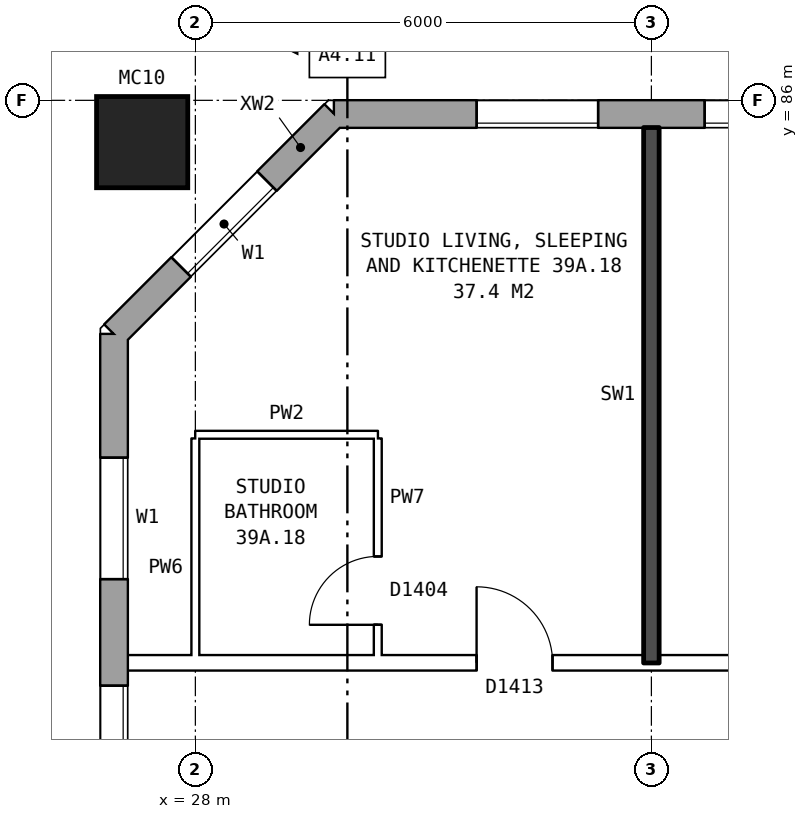
"""IFC4 building model, lengths in metres.
Left out: names, types, materials, properties, quantities, classifications, styles, units other than length and angle.
Written with IfcOpenShell. Run it as: python <this file> out.ifc"""

import sys

from ifc_helpers import new_model, si_unit, direction, frame, frame_2d, origin, origin_2d, place, context, subcontext, project, spatial, rectangle, hollow_rectangle, extrude, element, fill, save


model = new_model("IFC4")
c1 = context("Model", 3, precision=1e-05, world=origin(), true_north=direction((0.0, 1.0)))
c2 = subcontext(c1, "Body", "Model", "MODEL_VIEW")
j1 = project(units=[si_unit("LENGTHUNIT", "METRE"), si_unit("PLANEANGLEUNIT", "RADIAN")], contexts=[c1])
p1 = place(None, origin())
s1 = spatial("IfcSite", under=j1, at=p1, CompositionType="ELEMENT")
p2 = place(p1, origin())
s2 = spatial("IfcBuilding", under=s1, at=p2, CompositionType="ELEMENT")
p3 = place(p2, frame((0.0, 0.0, 139.2)))
s3 = spatial("IfcBuildingStorey", under=s2, at=p3, CompositionType="ELEMENT", Elevation=139.2)
p4 = place(p3, frame((27.3, 85.45, 0.0), z_axis=(0.0, 0.0, 1.0), x_axis=(1.0, 0.0, 0.0)))
e1 = element("IfcColumn", 1, at=p4, inside=s3, PredefinedType="COLUMN", context=c2, shape_type="SweptSolid", body=[
    extrude(hollow_rectangle(XDim=1.2, YDim=1.2, WallThickness=0.065, at=origin_2d()), origin(), (0.0, 0.0, 1.0), 3.1),
])
p5 = place(p3, frame((72.925, 85.82, 0.0), z_axis=(0.0, 0.0, 1.0), x_axis=(-1.0, 0.0, 0.0)))
e2 = element("IfcWall", 2, at=p5, inside=s3, PredefinedType="STANDARD", context=c2, shape_type="SweptSolid", body=[
    extrude(rectangle(XDim=43.101, YDim=0.36, at=frame_2d((21.55, 0.0))), origin(), (0.0, 0.0, 1.0), 2.85),
])
p6 = place(p5, frame((0.625, 0.0, 0.8)))
e3 = element("IfcOpeningElement", 3, at=p6, cuts=e2, PredefinedType="OPENING", context=c2, shape_type="SweptSolid", body=[
    extrude(rectangle(XDim=1.6, YDim=1.8, at=frame_2d((0.8, 0.9))), frame((0.0, 0.19, 0.0), z_axis=(0.0, -1.0, 0.0), x_axis=(1.0, 0.0, 0.0)), (0.0, 0.0, 1.0), 0.38),
])
p7 = place(p5, frame((3.625, 0.0, 0.8)))
e4 = element("IfcOpeningElement", 4, at=p7, cuts=e2, PredefinedType="OPENING", context=c2, shape_type="SweptSolid", body=[
    extrude(rectangle(XDim=1.6, YDim=1.8, at=frame_2d((0.8, 0.9))), frame((0.0, 0.19, 0.0), z_axis=(0.0, -1.0, 0.0), x_axis=(1.0, 0.0, 0.0)), (0.0, 0.0, 1.0), 0.38),
])
p8 = place(p5, frame((6.625, 0.0, 0.8)))
e5 = element("IfcOpeningElement", 5, at=p8, cuts=e2, PredefinedType="OPENING", context=c2, shape_type="SweptSolid", body=[
    extrude(rectangle(XDim=1.6, YDim=1.8, at=frame_2d((0.8, 0.9))), frame((0.0, 0.19, 0.0), z_axis=(0.0, -1.0, 0.0), x_axis=(1.0, 0.0, 0.0)), (0.0, 0.0, 1.0), 0.38),
])
p9 = place(p5, frame((9.625, 0.0, 0.8)))
e6 = element("IfcOpeningElement", 6, at=p9, cuts=e2, PredefinedType="OPENING", context=c2, shape_type="SweptSolid", body=[
    extrude(rectangle(XDim=1.6, YDim=1.8, at=frame_2d((0.8, 0.9))), frame((0.0, 0.19, 0.0), z_axis=(0.0, -1.0, 0.0), x_axis=(1.0, 0.0, 0.0)), (0.0, 0.0, 1.0), 0.38),
])
p10 = place(p5, frame((12.625, 0.0, 0.8)))
e7 = element("IfcOpeningElement", 7, at=p10, cuts=e2, PredefinedType="OPENING", context=c2, shape_type="SweptSolid", body=[
    extrude(rectangle(XDim=1.6, YDim=1.8, at=frame_2d((0.8, 0.9))), frame((0.0, 0.19, 0.0), z_axis=(0.0, -1.0, 0.0), x_axis=(1.0, 0.0, 0.0)), (0.0, 0.0, 1.0), 0.38),
])
p11 = place(p5, frame((15.625, 0.0, 0.8)))
e8 = element("IfcOpeningElement", 8, at=p11, cuts=e2, PredefinedType="OPENING", context=c2, shape_type="SweptSolid", body=[
    extrude(rectangle(XDim=1.6, YDim=1.8, at=frame_2d((0.8, 0.9))), frame((0.0, 0.19, 0.0), z_axis=(0.0, -1.0, 0.0), x_axis=(1.0, 0.0, 0.0)), (0.0, 0.0, 1.0), 0.38),
])
p12 = place(p5, frame((18.075, 0.0, 0.8)))
e9 = element("IfcOpeningElement", 9, at=p12, cuts=e2, PredefinedType="OPENING", context=c2, shape_type="SweptSolid", body=[
    extrude(rectangle(XDim=0.8, YDim=1.8, at=frame_2d((0.4, 0.9))), frame((0.0, 0.19, 0.0), z_axis=(0.0, -1.0, 0.0), x_axis=(1.0, 0.0, 0.0)), (0.0, 0.0, 1.0), 0.38),
])
p13 = place(p5, frame((21.125, 0.0, 0.15)))
e10 = element("IfcOpeningElement", 10, at=p13, cuts=e2, PredefinedType="OPENING", context=c2, shape_type="SweptSolid", body=[
    extrude(rectangle(XDim=1.0, YDim=1.5, at=frame_2d((0.5, 0.75))), frame((0.0, 0.19, 0.0), z_axis=(0.0, -1.0, 0.0), x_axis=(1.0, 0.0, 0.0)), (0.0, 0.0, 1.0), 0.38),
])
p14 = place(p5, frame((24.625, 0.0, 0.8)))
e11 = element("IfcOpeningElement", 11, at=p14, cuts=e2, PredefinedType="OPENING", context=c2, shape_type="SweptSolid", body=[
    extrude(rectangle(XDim=1.6, YDim=1.8, at=frame_2d((0.8, 0.9))), frame((0.0, 0.19, 0.0), z_axis=(0.0, -1.0, 0.0), x_axis=(1.0, 0.0, 0.0)), (0.0, 0.0, 1.0), 0.38),
])
p15 = place(p5, frame((27.625, 0.0, 0.8)))
e12 = element("IfcOpeningElement", 12, at=p15, cuts=e2, PredefinedType="OPENING", context=c2, shape_type="SweptSolid", body=[
    extrude(rectangle(XDim=1.6, YDim=1.8, at=frame_2d((0.8, 0.9))), frame((0.0, 0.19, 0.0), z_axis=(0.0, -1.0, 0.0), x_axis=(1.0, 0.0, 0.0)), (0.0, 0.0, 1.0), 0.38),
])
p16 = place(p5, frame((30.625, 0.0, 0.8)))
e13 = element("IfcOpeningElement", 13, at=p16, cuts=e2, PredefinedType="OPENING", context=c2, shape_type="SweptSolid", body=[
    extrude(rectangle(XDim=1.6, YDim=1.8, at=frame_2d((0.8, 0.9))), frame((0.0, 0.19, 0.0), z_axis=(0.0, -1.0, 0.0), x_axis=(1.0, 0.0, 0.0)), (0.0, 0.0, 1.0), 0.38),
])
p17 = place(p5, frame((33.625, 0.0, 0.8)))
e14 = element("IfcOpeningElement", 14, at=p17, cuts=e2, PredefinedType="OPENING", context=c2, shape_type="SweptSolid", body=[
    extrude(rectangle(XDim=1.6, YDim=1.8, at=frame_2d((0.8, 0.9))), frame((0.0, 0.19, 0.0), z_axis=(0.0, -1.0, 0.0), x_axis=(1.0, 0.0, 0.0)), (0.0, 0.0, 1.0), 0.38),
])
p18 = place(p5, frame((36.625, 0.0, 0.8)))
e15 = element("IfcOpeningElement", 15, at=p18, cuts=e2, PredefinedType="OPENING", context=c2, shape_type="SweptSolid", body=[
    extrude(rectangle(XDim=1.6, YDim=1.8, at=frame_2d((0.8, 0.9))), frame((0.0, 0.19, 0.0), z_axis=(0.0, -1.0, 0.0), x_axis=(1.0, 0.0, 0.0)), (0.0, 0.0, 1.0), 0.38),
])
p19 = place(p5, frame((39.625, 0.0, 0.8)))
e16 = element("IfcOpeningElement", 16, at=p19, cuts=e2, PredefinedType="OPENING", context=c2, shape_type="SweptSolid", body=[
    extrude(rectangle(XDim=1.6, YDim=1.8, at=frame_2d((0.8, 0.9))), frame((0.0, 0.19, 0.0), z_axis=(0.0, -1.0, 0.0), x_axis=(1.0, 0.0, 0.0)), (0.0, 0.0, 1.0), 0.38),
])
p20 = place(p5, frame((19.175, 0.0, 1.6)))
e17 = element("IfcOpeningElement", 17, at=p20, cuts=e2, PredefinedType="OPENING", context=c2, shape_type="SweptSolid", body=[
    extrude(rectangle(XDim=0.6, YDim=0.9, at=frame_2d((0.3, 0.45))), frame((0.0, 0.19, 0.0), z_axis=(0.0, -1.0, 0.0), x_axis=(1.0, 0.0, 0.0)), (0.0, 0.0, 1.0), 0.38),
])
p21 = place(p3, frame((29.825, 85.82, 0.0), z_axis=(0.0, 0.0, 1.0), x_axis=(-0.707106781187, -0.707106781187, 0.0)))
e18 = element("IfcWall", 18, at=p21, inside=s3, PredefinedType="STANDARD", context=c2, shape_type="SweptSolid", body=[
    extrude(rectangle(XDim=4.094, YDim=0.36, at=frame_2d((2.047, 0.0))), origin(), (0.0, 0.0, 1.0), 2.85),
])
p22 = place(p21, frame((1.247, 0.0, 0.8)))
e19 = element("IfcOpeningElement", 19, at=p22, cuts=e18, PredefinedType="OPENING", context=c2, shape_type="SweptSolid", body=[
    extrude(rectangle(XDim=1.6, YDim=1.8, at=frame_2d((0.8, 0.9))), frame((0.0, 0.19, 0.0), z_axis=(0.0, -1.0, 0.0), x_axis=(1.0, 0.0, 0.0)), (0.0, 0.0, 1.0), 0.38),
])
p23 = place(p3, frame((26.93, 82.925, 0.0), z_axis=(0.0, 0.0, 1.0), x_axis=(0.0, -1.0, 0.0)))
e20 = element("IfcWall", 20, at=p23, inside=s3, PredefinedType="STANDARD", context=c2, shape_type="SweptSolid", body=[
    extrude(rectangle(XDim=25.851, YDim=0.36, at=frame_2d((12.925, 0.0))), origin(), (0.0, 0.0, 1.0), 2.85),
])
p24 = place(p23, frame((1.625, 0.0, 0.8)))
e21 = element("IfcOpeningElement", 21, at=p24, cuts=e20, PredefinedType="OPENING", context=c2, shape_type="SweptSolid", body=[
    extrude(rectangle(XDim=1.6, YDim=1.8, at=frame_2d((0.8, 0.9))), frame((0.0, 0.19, 0.0), z_axis=(0.0, -1.0, 0.0), x_axis=(1.0, 0.0, 0.0)), (0.0, 0.0, 1.0), 0.38),
])
p25 = place(p23, frame((4.625, 0.0, 0.8)))
e22 = element("IfcOpeningElement", 22, at=p25, cuts=e20, PredefinedType="OPENING", context=c2, shape_type="SweptSolid", body=[
    extrude(rectangle(XDim=1.6, YDim=1.8, at=frame_2d((0.8, 0.9))), frame((0.0, 0.19, 0.0), z_axis=(0.0, -1.0, 0.0), x_axis=(1.0, 0.0, 0.0)), (0.0, 0.0, 1.0), 0.38),
])
p26 = place(p23, frame((7.625, 0.0, 0.8)))
e23 = element("IfcOpeningElement", 23, at=p26, cuts=e20, PredefinedType="OPENING", context=c2, shape_type="SweptSolid", body=[
    extrude(rectangle(XDim=1.6, YDim=1.8, at=frame_2d((0.8, 0.9))), frame((0.0, 0.19, 0.0), z_axis=(0.0, -1.0, 0.0), x_axis=(1.0, 0.0, 0.0)), (0.0, 0.0, 1.0), 0.38),
])
p27 = place(p23, frame((10.625, 0.0, 0.8)))
e24 = element("IfcOpeningElement", 24, at=p27, cuts=e20, PredefinedType="OPENING", context=c2, shape_type="SweptSolid", body=[
    extrude(rectangle(XDim=1.6, YDim=1.8, at=frame_2d((0.8, 0.9))), frame((0.0, 0.19, 0.0), z_axis=(0.0, -1.0, 0.0), x_axis=(1.0, 0.0, 0.0)), (0.0, 0.0, 1.0), 0.38),
])
p28 = place(p23, frame((13.625, 0.0, 0.8)))
e25 = element("IfcOpeningElement", 25, at=p28, cuts=e20, PredefinedType="OPENING", context=c2, shape_type="SweptSolid", body=[
    extrude(rectangle(XDim=1.6, YDim=1.8, at=frame_2d((0.8, 0.9))), frame((0.0, 0.19, 0.0), z_axis=(0.0, -1.0, 0.0), x_axis=(1.0, 0.0, 0.0)), (0.0, 0.0, 1.0), 0.38),
])
p29 = place(p23, frame((16.625, 0.0, 0.8)))
e26 = element("IfcOpeningElement", 26, at=p29, cuts=e20, PredefinedType="OPENING", context=c2, shape_type="SweptSolid", body=[
    extrude(rectangle(XDim=1.6, YDim=1.8, at=frame_2d((0.8, 0.9))), frame((0.0, 0.19, 0.0), z_axis=(0.0, -1.0, 0.0), x_axis=(1.0, 0.0, 0.0)), (0.0, 0.0, 1.0), 0.38),
])
p30 = place(p23, frame((19.625, 0.0, 0.8)))
e27 = element("IfcOpeningElement", 27, at=p30, cuts=e20, PredefinedType="OPENING", context=c2, shape_type="SweptSolid", body=[
    extrude(rectangle(XDim=1.6, YDim=1.8, at=frame_2d((0.8, 0.9))), frame((0.0, 0.19, 0.0), z_axis=(0.0, -1.0, 0.0), x_axis=(1.0, 0.0, 0.0)), (0.0, 0.0, 1.0), 0.38),
])
p31 = place(p23, frame((22.625, 0.0, 0.8)))
e28 = element("IfcOpeningElement", 28, at=p31, cuts=e20, PredefinedType="OPENING", context=c2, shape_type="SweptSolid", body=[
    extrude(rectangle(XDim=1.6, YDim=1.8, at=frame_2d((0.8, 0.9))), frame((0.0, 0.19, 0.0), z_axis=(0.0, -1.0, 0.0), x_axis=(1.0, 0.0, 0.0)), (0.0, 0.0, 1.0), 0.38),
])
p32 = place(p3, frame((27.11, 78.6, 0.0), z_axis=(0.0, 0.0, 1.0), x_axis=(1.0, 0.0, 0.0)))
e29 = element("IfcWall", 29, at=p32, inside=s3, PredefinedType="PARTITIONING", context=c2, shape_type="SweptSolid", body=[
    extrude(rectangle(XDim=18.79, YDim=0.2, at=frame_2d((9.395, 0.0))), origin(), (0.0, 0.0, 1.0), 2.85),
])
p33 = place(p32, frame((14.19, 0.0, 0.0)))
e30 = element("IfcOpeningElement", 30, at=p33, cuts=e29, PredefinedType="OPENING", context=c2, shape_type="SweptSolid", body=[
    extrude(rectangle(XDim=1.0, YDim=2.1, at=frame_2d((0.5, 1.05))), frame((0.0, 0.11, 0.0), z_axis=(0.0, -1.0, 0.0), x_axis=(1.0, 0.0, 0.0)), (0.0, 0.0, 1.0), 0.22),
])
p34 = place(p32, frame((8.19, 0.0, 0.0)))
e31 = element("IfcOpeningElement", 31, at=p34, cuts=e29, PredefinedType="OPENING", context=c2, shape_type="SweptSolid", body=[
    extrude(rectangle(XDim=1.0, YDim=2.1, at=frame_2d((0.5, 1.05))), frame((0.0, 0.11, 0.0), z_axis=(0.0, -1.0, 0.0), x_axis=(1.0, 0.0, 0.0)), (0.0, 0.0, 1.0), 0.22),
])
p35 = place(p32, frame((4.59, 0.0, 0.0)))
e32 = element("IfcOpeningElement", 32, at=p35, cuts=e29, PredefinedType="OPENING", context=c2, shape_type="SweptSolid", body=[
    extrude(rectangle(XDim=1.0, YDim=2.1, at=frame_2d((0.5, 1.05))), frame((0.0, 0.11, 0.0), z_axis=(0.0, -1.0, 0.0), x_axis=(1.0, 0.0, 0.0)), (0.0, 0.0, 1.0), 0.22),
])
p36 = place(p3, frame((28.0, 81.6, 0.0), z_axis=(0.0, 0.0, 1.0), x_axis=(1.0, 0.0, 0.0)))
e33 = element("IfcWall", 33, at=p36, inside=s3, PredefinedType="PARTITIONING", context=c2, shape_type="SweptSolid", body=[
    extrude(rectangle(XDim=2.4, YDim=0.1, at=frame_2d((1.2, 0.0))), origin(), (0.0, 0.0, 1.0), 2.85),
])
p37 = place(p3, frame((28.0, 78.7, 0.0), z_axis=(0.0, 0.0, 1.0), x_axis=(0.0, 1.0, 0.0)))
e34 = element("IfcWall", 34, at=p37, inside=s3, PredefinedType="PARTITIONING", context=c2, shape_type="SweptSolid", body=[
    extrude(rectangle(XDim=2.85, YDim=0.1, at=frame_2d((1.425, 0.0))), origin(), (0.0, 0.0, 1.0), 2.85),
])
p38 = place(p3, frame((30.4, 78.7, 0.0), z_axis=(0.0, 0.0, 1.0), x_axis=(0.0, 1.0, 0.0)))
e35 = element("IfcWall", 35, at=p38, inside=s3, PredefinedType="PARTITIONING", context=c2, shape_type="SweptSolid", body=[
    extrude(rectangle(XDim=2.85, YDim=0.1, at=frame_2d((1.425, 0.0))), origin(), (0.0, 0.0, 1.0), 2.85),
])
p39 = place(p38, frame((0.4, 0.0, 0.0)))
e36 = element("IfcOpeningElement", 36, at=p39, cuts=e35, PredefinedType="OPENING", context=c2, shape_type="SweptSolid", body=[
    extrude(rectangle(XDim=0.9, YDim=2.1, at=frame_2d((0.45, 1.05))), frame((0.0, 0.06, 0.0), z_axis=(0.0, -1.0, 0.0), x_axis=(1.0, 0.0, 0.0)), (0.0, 0.0, 1.0), 0.12),
])
p40 = place(p3, frame((34.0, 78.6, 0.0), z_axis=(0.0, 0.0, 1.0), x_axis=(0.0, 1.0, 0.0)))
e37 = element("IfcWall", 37, at=p40, inside=s3, PredefinedType="SOLIDWALL", context=c2, shape_type="SweptSolid", body=[
    extrude(rectangle(XDim=7.04, YDim=0.2, at=frame_2d((3.52, 0.0))), origin(), (0.0, 0.0, 1.0), 2.85),
])
p41 = place(p18, origin())
e38 = element("IfcWindow", 38, at=p41, inside=s3, PartitioningType="SINGLE_PANEL", PredefinedType="WINDOW", context=c2, shape_type="SweptSolid", body=[
    extrude(rectangle(XDim=1.6, YDim=1.8, at=frame_2d((0.8, 0.9))), frame((0.0, 0.15, 0.0), z_axis=(0.0, -1.0, 0.0), x_axis=(1.0, 0.0, 0.0)), (0.0, 0.0, 1.0), 0.06),
])
fill(e15, e38)
p42 = place(p19, origin())
e39 = element("IfcWindow", 39, at=p42, inside=s3, PartitioningType="SINGLE_PANEL", PredefinedType="WINDOW", context=c2, shape_type="SweptSolid", body=[
    extrude(rectangle(XDim=1.6, YDim=1.8, at=frame_2d((0.8, 0.9))), frame((0.0, 0.15, 0.0), z_axis=(0.0, -1.0, 0.0), x_axis=(1.0, 0.0, 0.0)), (0.0, 0.0, 1.0), 0.06),
])
fill(e16, e39)
p43 = place(p22, origin())
e40 = element("IfcWindow", 40, at=p43, inside=s3, PartitioningType="SINGLE_PANEL", PredefinedType="WINDOW", context=c2, shape_type="SweptSolid", body=[
    extrude(rectangle(XDim=1.6, YDim=1.8, at=frame_2d((0.8, 0.9))), frame((0.0, 0.15, 0.0), z_axis=(0.0, -1.0, 0.0), x_axis=(1.0, 0.0, 0.0)), (0.0, 0.0, 1.0), 0.06),
])
fill(e19, e40)
p44 = place(p24, origin())
e41 = element("IfcWindow", 41, at=p44, inside=s3, PartitioningType="SINGLE_PANEL", PredefinedType="WINDOW", context=c2, shape_type="SweptSolid", body=[
    extrude(rectangle(XDim=1.6, YDim=1.8, at=frame_2d((0.8, 0.9))), frame((0.0, 0.15, 0.0), z_axis=(0.0, -1.0, 0.0), x_axis=(1.0, 0.0, 0.0)), (0.0, 0.0, 1.0), 0.06),
])
fill(e21, e41)
p45 = place(p25, origin())
e42 = element("IfcWindow", 42, at=p45, inside=s3, PartitioningType="SINGLE_PANEL", PredefinedType="WINDOW", context=c2, shape_type="SweptSolid", body=[
    extrude(rectangle(XDim=1.6, YDim=1.8, at=frame_2d((0.8, 0.9))), frame((0.0, 0.15, 0.0), z_axis=(0.0, -1.0, 0.0), x_axis=(1.0, 0.0, 0.0)), (0.0, 0.0, 1.0), 0.06),
])
fill(e22, e42)
p46 = place(p35, origin())
e43 = element("IfcDoor", 43, at=p46, inside=s3, OperationType="SINGLE_SWING_LEFT", PredefinedType="DOOR", context=c2, shape_type="SweptSolid", body=[
    extrude(rectangle(XDim=1.0, YDim=2.1, at=frame_2d((0.5, 1.05))), frame((0.0, 0.025, 0.0), z_axis=(0.0, -1.0, 0.0), x_axis=(1.0, 0.0, 0.0)), (0.0, 0.0, 1.0), 0.05),
])
fill(e32, e43)
p47 = place(p39, origin())
e44 = element("IfcDoor", 44, at=p47, inside=s3, OperationType="SINGLE_SWING_LEFT", PredefinedType="DOOR", context=c2, shape_type="SweptSolid", body=[
    extrude(rectangle(XDim=0.9, YDim=2.1, at=frame_2d((0.45, 1.05))), frame((0.0, 0.025, 0.0), z_axis=(0.0, -1.0, 0.0), x_axis=(1.0, 0.0, 0.0)), (0.0, 0.0, 1.0), 0.05),
])
fill(e36, e44)
save(model, sys.argv[1])
